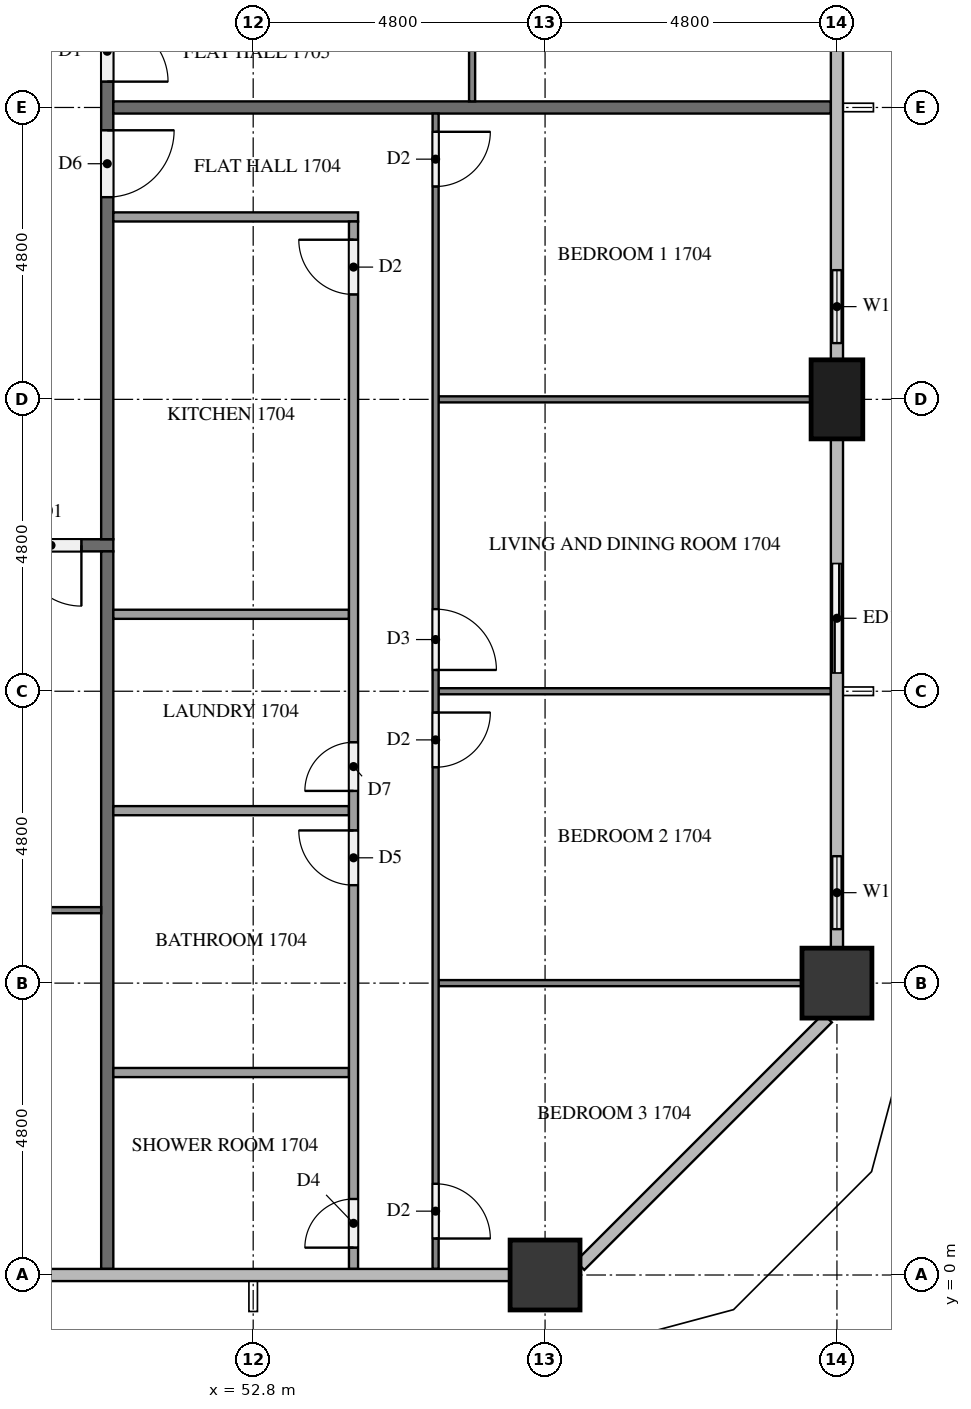
"""IFC4 building model, lengths in metres.
Left out: names, types, materials, properties, quantities, classifications, styles, units other than length and angle.
Written with IfcOpenShell. Run it as: python <this file> out.ifc"""

import sys

from ifc_helpers import new_model, si_unit, direction, frame, frame_2d, origin, origin_2d, place, context, subcontext, project, spatial, rectangle, extrude, element, fill, save


model = new_model("IFC4")
c1 = context("Model", 3, precision=1e-05, world=origin(), true_north=direction((0.0, 1.0)))
c2 = subcontext(c1, "Body", "Model", "MODEL_VIEW")
j1 = project(units=[si_unit("LENGTHUNIT", "METRE"), si_unit("PLANEANGLEUNIT", "RADIAN")], contexts=[c1])
p1 = place(None, origin())
s1 = spatial("IfcSite", under=j1, at=p1, CompositionType="ELEMENT")
p2 = place(p1, origin())
s2 = spatial("IfcBuilding", under=s1, at=p2, CompositionType="ELEMENT")
p3 = place(p2, frame((0.0, 0.0, 69.8)))
s3 = spatial("IfcBuildingStorey", under=s2, at=p3, CompositionType="ELEMENT", Elevation=69.8)
for number, where, z_axis, x_axis in (
    (1, (57.6, 0.0, 0.0), (0.0, 0.0, 1.0), (1.0, 0.0, 0.0)),
    (2, (62.4, 4.8, 0.0), (0.0, 0.0, 1.0), (1.0, 0.0, 0.0)),
):
    element("IfcColumn", number, at=place(p3, frame(where, z_axis=z_axis, x_axis=x_axis)), inside=s3, PredefinedType="COLUMN", context=c2, shape_type="SweptSolid", body=[
        extrude(rectangle(XDim=1.15, YDim=1.15, at=origin_2d()), origin(), (0.0, 0.0, 1.0), 3.2),
    ])
p4 = place(p3, frame((62.4, 14.4, 0.0), z_axis=(0.0, 0.0, 1.0), x_axis=(0.0, 1.0, 0.0)))
e3 = element("IfcColumn", 3, at=p4, inside=s3, PredefinedType="COLUMN", context=c2, shape_type="SweptSolid", body=[
    extrude(rectangle(XDim=1.3, YDim=0.85, at=origin_2d()), origin(), (0.0, 0.0, 1.0), 3.2),
])
p5 = place(p3, frame((62.4, 5.375, 0.0), z_axis=(0.0, 0.0, 1.0), x_axis=(0.0, 1.0, 0.0)))
e4 = element("IfcWall", 4, at=p5, inside=s3, PredefinedType="SOLIDWALL", context=c2, shape_type="SweptSolid", body=[
    extrude(rectangle(XDim=1.825, YDim=0.15, at=frame_2d((0.913, 0.0))), origin(), (0.0, 0.0, 1.0), 3.2),
])
p6 = place(p5, frame((0.312, 0.0, 0.9)))
e5 = element("IfcOpeningElement", 5, at=p6, cuts=e4, PredefinedType="OPENING", context=c2, shape_type="SweptSolid", body=[
    extrude(rectangle(XDim=1.2, YDim=1.4, at=frame_2d((0.6, 0.7))), frame((0.0, 0.085, 0.0), z_axis=(0.0, -1.0, 0.0), x_axis=(1.0, 0.0, 0.0)), (0.0, 0.0, 1.0), 0.17),
])
p7 = place(p3, frame((62.4, 9.6, 0.0), z_axis=(0.0, 0.0, 1.0), x_axis=(0.0, 1.0, 0.0)))
e6 = element("IfcWall", 6, at=p7, inside=s3, PredefinedType="SOLIDWALL", context=c2, shape_type="SweptSolid", body=[
    extrude(rectangle(XDim=2.4, YDim=0.15, at=frame_2d((1.2, 0.0))), origin(), (0.0, 0.0, 1.0), 3.2),
])
p8 = place(p7, frame((0.3, 0.0, 0.0)))
e7 = element("IfcOpeningElement", 7, at=p8, cuts=e6, PredefinedType="OPENING", context=c2, shape_type="SweptSolid", body=[
    extrude(rectangle(XDim=1.8, YDim=2.4, at=frame_2d((0.9, 1.2))), frame((0.0, 0.085, 0.0), z_axis=(0.0, -1.0, 0.0), x_axis=(1.0, 0.0, 0.0)), (0.0, 0.0, 1.0), 0.17),
])
p9 = place(p3, frame((62.4, 15.05, 0.0), z_axis=(0.0, 0.0, 1.0), x_axis=(0.0, 1.0, 0.0)))
e8 = element("IfcWall", 8, at=p9, inside=s3, PredefinedType="SOLIDWALL", context=c2, shape_type="SweptSolid", body=[
    extrude(rectangle(XDim=1.75, YDim=0.15, at=frame_2d((0.875, 0.0))), origin(), (0.0, 0.0, 1.0), 3.2),
])
p10 = place(p9, frame((0.275, 0.0, 0.9)))
e9 = element("IfcOpeningElement", 9, at=p10, cuts=e8, PredefinedType="OPENING", context=c2, shape_type="SweptSolid", body=[
    extrude(rectangle(XDim=1.2, YDim=1.4, at=frame_2d((0.6, 0.7))), frame((0.0, 0.085, 0.0), z_axis=(0.0, -1.0, 0.0), x_axis=(1.0, 0.0, 0.0)), (0.0, 0.0, 1.0), 0.17),
])
p11 = place(p3, frame((50.5, 12.0, 0.0), z_axis=(0.0, 0.0, 1.0), x_axis=(-1.0, 0.0, 0.0)))
e10 = element("IfcWall", 10, at=p11, inside=s3, PredefinedType="PARTITIONING", context=c2, shape_type="SweptSolid", body=[
    extrude(rectangle(XDim=38.6, YDim=0.2, at=frame_2d((19.3, 0.0))), origin(), (0.0, 0.0, 1.0), 3.2),
])
p12 = place(p11, frame((37.075, 0.0, 0.0)))
e11 = element("IfcOpeningElement", 11, at=p12, cuts=e10, PredefinedType="OPENING", context=c2, shape_type="SweptSolid", body=[
    extrude(rectangle(XDim=1.0, YDim=2.1, at=frame_2d((0.5, 1.05))), frame((0.0, 0.11, 0.0), z_axis=(0.0, -1.0, 0.0), x_axis=(1.0, 0.0, 0.0)), (0.0, 0.0, 1.0), 0.22),
])
p13 = place(p11, frame((22.675, 0.0, 0.0)))
e12 = element("IfcOpeningElement", 12, at=p13, cuts=e10, PredefinedType="OPENING", context=c2, shape_type="SweptSolid", body=[
    extrude(rectangle(XDim=1.0, YDim=2.1, at=frame_2d((0.5, 1.05))), frame((0.0, 0.11, 0.0), z_axis=(0.0, -1.0, 0.0), x_axis=(1.0, 0.0, 0.0)), (0.0, 0.0, 1.0), 0.22),
])
p14 = place(p11, frame((0.525, 0.0, 0.0)))
e13 = element("IfcOpeningElement", 13, at=p14, cuts=e10, PredefinedType="OPENING", context=c2, shape_type="SweptSolid", body=[
    extrude(rectangle(XDim=1.0, YDim=2.1, at=frame_2d((0.5, 1.05))), frame((0.0, 0.11, 0.0), z_axis=(0.0, -1.0, 0.0), x_axis=(1.0, 0.0, 0.0)), (0.0, 0.0, 1.0), 0.22),
])
p15 = place(p3, frame((50.4, 40.7, 0.0), z_axis=(0.0, 0.0, 1.0), x_axis=(0.0, -1.0, 0.0)))
e14 = element("IfcWall", 14, at=p15, inside=s3, PredefinedType="PARTITIONING", context=c2, shape_type="SweptSolid", body=[
    extrude(rectangle(XDim=28.6, YDim=0.2, at=frame_2d((14.3, 0.0))), origin(), (0.0, 0.0, 1.0), 3.2),
])
p16 = place(p15, frame((21.875, 0.0, 0.0)))
e15 = element("IfcOpeningElement", 15, at=p16, cuts=e14, PredefinedType="OPENING", context=c2, shape_type="SweptSolid", body=[
    extrude(rectangle(XDim=1.1, YDim=2.1, at=frame_2d((0.55, 1.05))), frame((0.0, 0.11, 0.0), z_axis=(0.0, -1.0, 0.0), x_axis=(1.0, 0.0, 0.0)), (0.0, 0.0, 1.0), 0.22),
])
p17 = place(p15, frame((20.075, 0.0, 0.0)))
e16 = element("IfcOpeningElement", 16, at=p17, cuts=e14, PredefinedType="OPENING", context=c2, shape_type="SweptSolid", body=[
    extrude(rectangle(XDim=1.0, YDim=2.1, at=frame_2d((0.5, 1.05))), frame((0.0, 0.11, 0.0), z_axis=(0.0, -1.0, 0.0), x_axis=(1.0, 0.0, 0.0)), (0.0, 0.0, 1.0), 0.22),
])
p18 = place(p15, frame((5.675, 0.0, 0.0)))
e17 = element("IfcOpeningElement", 17, at=p18, cuts=e14, PredefinedType="OPENING", context=c2, shape_type="SweptSolid", body=[
    extrude(rectangle(XDim=1.0, YDim=2.1, at=frame_2d((0.5, 1.05))), frame((0.0, 0.11, 0.0), z_axis=(0.0, -1.0, 0.0), x_axis=(1.0, 0.0, 0.0)), (0.0, 0.0, 1.0), 0.22),
])
p19 = place(p3, frame((50.4, 11.9, 0.0), z_axis=(0.0, 0.0, 1.0), x_axis=(0.0, -1.0, 0.0)))
e18 = element("IfcWall", 18, at=p19, inside=s3, PredefinedType="PARTITIONING", context=c2, shape_type="SweptSolid", body=[
    extrude(rectangle(XDim=11.8, YDim=0.2, at=frame_2d((5.9, 0.0))), origin(), (0.0, 0.0, 1.0), 3.2),
])
p20 = place(p3, frame((50.5, 19.2, 0.0), z_axis=(0.0, 0.0, 1.0), x_axis=(1.0, 0.0, 0.0)))
e19 = element("IfcWall", 19, at=p20, inside=s3, PredefinedType="PARTITIONING", context=c2, shape_type="SweptSolid", body=[
    extrude(rectangle(XDim=11.8, YDim=0.2, at=frame_2d((5.9, 0.0))), origin(), (0.0, 0.0, 1.0), 3.2),
])
p21 = place(p3, frame((50.3, 6.0, 0.0), z_axis=(0.0, 0.0, 1.0), x_axis=(-1.0, 0.0, 0.0)))
e20 = element("IfcWall", 20, at=p21, inside=s3, PredefinedType="PARTITIONING", context=c2, shape_type="SweptSolid", body=[
    extrude(rectangle(XDim=11.8, YDim=0.1, at=frame_2d((5.9, 0.0))), origin(), (0.0, 0.0, 1.0), 3.2),
])
p22 = place(p21, frame((5.75, 0.0, 0.0)))
e21 = element("IfcOpeningElement", 21, at=p22, cuts=e20, PredefinedType="OPENING", context=c2, shape_type="SweptSolid", body=[
    extrude(rectangle(XDim=1.0, YDim=2.1, at=frame_2d((0.5, 1.05))), frame((0.0, 0.06, 0.0), z_axis=(0.0, -1.0, 0.0), x_axis=(1.0, 0.0, 0.0)), (0.0, 0.0, 1.0), 0.12),
])
p23 = place(p21, frame((7.45, 0.0, 0.0)))
e22 = element("IfcOpeningElement", 22, at=p23, cuts=e20, PredefinedType="OPENING", context=c2, shape_type="SweptSolid", body=[
    extrude(rectangle(XDim=0.9, YDim=2.1, at=frame_2d((0.45, 1.05))), frame((0.0, 0.06, 0.0), z_axis=(0.0, -1.0, 0.0), x_axis=(1.0, 0.0, 0.0)), (0.0, 0.0, 1.0), 0.12),
])
p24 = place(p3, frame((55.85, 14.4, 0.0), z_axis=(0.0, 0.0, 1.0), x_axis=(1.0, 0.0, 0.0)))
e23 = element("IfcWall", 23, at=p24, inside=s3, PredefinedType="PARTITIONING", context=c2, shape_type="SweptSolid", body=[
    extrude(rectangle(XDim=6.125, YDim=0.1, at=frame_2d((3.062, 0.0))), origin(), (0.0, 0.0, 1.0), 3.2),
])
p25 = place(p3, frame((55.85, 9.6, 0.0), z_axis=(0.0, 0.0, 1.0), x_axis=(1.0, 0.0, 0.0)))
e24 = element("IfcWall", 24, at=p25, inside=s3, PredefinedType="PARTITIONING", context=c2, shape_type="SweptSolid", body=[
    extrude(rectangle(XDim=6.45, YDim=0.1, at=frame_2d((3.225, 0.0))), origin(), (0.0, 0.0, 1.0), 3.2),
])
p26 = place(p3, frame((55.85, 4.8, 0.0), z_axis=(0.0, 0.0, 1.0), x_axis=(1.0, 0.0, 0.0)))
e25 = element("IfcWall", 25, at=p26, inside=s3, PredefinedType="PARTITIONING", context=c2, shape_type="SweptSolid", body=[
    extrude(rectangle(XDim=5.975, YDim=0.1, at=frame_2d((2.987, 0.0))), origin(), (0.0, 0.0, 1.0), 3.2),
])
p27 = place(p3, frame((55.8, 19.1, 0.0), z_axis=(0.0, 0.0, 1.0), x_axis=(0.0, -1.0, 0.0)))
e26 = element("IfcWall", 26, at=p27, inside=s3, PredefinedType="PARTITIONING", context=c2, shape_type="SweptSolid", body=[
    extrude(rectangle(XDim=19.0, YDim=0.1, at=frame_2d((9.5, 0.0))), origin(), (0.0, 0.0, 1.0), 3.2),
])
p28 = place(p27, frame((0.3, 0.0, 0.0)))
e27 = element("IfcOpeningElement", 27, at=p28, cuts=e26, PredefinedType="OPENING", context=c2, shape_type="SweptSolid", body=[
    extrude(rectangle(XDim=0.9, YDim=2.1, at=frame_2d((0.45, 1.05))), frame((0.0, 0.06, 0.0), z_axis=(0.0, -1.0, 0.0), x_axis=(1.0, 0.0, 0.0)), (0.0, 0.0, 1.0), 0.12),
])
p29 = place(p27, frame((8.15, 0.0, 0.0)))
e28 = element("IfcOpeningElement", 28, at=p29, cuts=e26, PredefinedType="OPENING", context=c2, shape_type="SweptSolid", body=[
    extrude(rectangle(XDim=1.0, YDim=2.1, at=frame_2d((0.5, 1.05))), frame((0.0, 0.06, 0.0), z_axis=(0.0, -1.0, 0.0), x_axis=(1.0, 0.0, 0.0)), (0.0, 0.0, 1.0), 0.12),
])
p30 = place(p27, frame((9.85, 0.0, 0.0)))
e29 = element("IfcOpeningElement", 29, at=p30, cuts=e26, PredefinedType="OPENING", context=c2, shape_type="SweptSolid", body=[
    extrude(rectangle(XDim=0.9, YDim=2.1, at=frame_2d((0.45, 1.05))), frame((0.0, 0.06, 0.0), z_axis=(0.0, -1.0, 0.0), x_axis=(1.0, 0.0, 0.0)), (0.0, 0.0, 1.0), 0.12),
])
p31 = place(p27, frame((17.6, 0.0, 0.0)))
e30 = element("IfcOpeningElement", 30, at=p31, cuts=e26, PredefinedType="OPENING", context=c2, shape_type="SweptSolid", body=[
    extrude(rectangle(XDim=0.9, YDim=2.1, at=frame_2d((0.45, 1.05))), frame((0.0, 0.06, 0.0), z_axis=(0.0, -1.0, 0.0), x_axis=(1.0, 0.0, 0.0)), (0.0, 0.0, 1.0), 0.12),
])
for number, where, z_axis, x_axis in (
    (31, (50.5, 10.865, 0.0), (0.0, 0.0, 1.0), (1.0, 0.0, 0.0)),
    (32, (50.5, 7.636, 0.0), (0.0, 0.0, 1.0), (1.0, 0.0, 0.0)),
    (33, (50.5, 3.33, 0.0), (0.0, 0.0, 1.0), (1.0, 0.0, 0.0)),
):
    element("IfcWall", number, at=place(p3, frame(where, z_axis=z_axis, x_axis=x_axis)), inside=s3, PredefinedType="PARTITIONING", context=c2, shape_type="SweptSolid", body=[
        extrude(rectangle(XDim=3.875, YDim=0.15, at=frame_2d((1.938, 0.0))), origin(), (0.0, 0.0, 1.0), 3.2),
    ])
p32 = place(p3, frame((50.5, 17.4, 0.0), z_axis=(0.0, 0.0, 1.0), x_axis=(1.0, 0.0, 0.0)))
e34 = element("IfcWall", 34, at=p32, inside=s3, PredefinedType="PARTITIONING", context=c2, shape_type="SweptSolid", body=[
    extrude(rectangle(XDim=4.025, YDim=0.15, at=frame_2d((2.012, 0.0))), origin(), (0.0, 0.0, 1.0), 3.2),
])
p33 = place(p3, frame((54.45, 0.1, 0.0), z_axis=(0.0, 0.0, 1.0), x_axis=(0.0, 1.0, 0.0)))
e35 = element("IfcWall", 35, at=p33, inside=s3, PredefinedType="PARTITIONING", context=c2, shape_type="SweptSolid", body=[
    extrude(rectangle(XDim=17.225, YDim=0.15, at=frame_2d((8.612, 0.0))), origin(), (0.0, 0.0, 1.0), 3.2),
])
p34 = place(p33, frame((16.025, 0.0, 0.0)))
e36 = element("IfcOpeningElement", 36, at=p34, cuts=e35, PredefinedType="OPENING", context=c2, shape_type="SweptSolid", body=[
    extrude(rectangle(XDim=0.9, YDim=2.1, at=frame_2d((0.45, 1.05))), frame((0.0, 0.085, 0.0), z_axis=(0.0, -1.0, 0.0), x_axis=(1.0, 0.0, 0.0)), (0.0, 0.0, 1.0), 0.17),
])
p35 = place(p33, frame((7.861, 0.0, 0.0)))
e37 = element("IfcOpeningElement", 37, at=p35, cuts=e35, PredefinedType="OPENING", context=c2, shape_type="SweptSolid", body=[
    extrude(rectangle(XDim=0.8, YDim=2.1, at=frame_2d((0.4, 1.05))), frame((0.0, 0.085, 0.0), z_axis=(0.0, -1.0, 0.0), x_axis=(1.0, 0.0, 0.0)), (0.0, 0.0, 1.0), 0.17),
])
p36 = place(p33, frame((6.311, 0.0, 0.0)))
e38 = element("IfcOpeningElement", 38, at=p36, cuts=e35, PredefinedType="OPENING", context=c2, shape_type="SweptSolid", body=[
    extrude(rectangle(XDim=0.9, YDim=2.1, at=frame_2d((0.45, 1.05))), frame((0.0, 0.085, 0.0), z_axis=(0.0, -1.0, 0.0), x_axis=(1.0, 0.0, 0.0)), (0.0, 0.0, 1.0), 0.17),
])
p37 = place(p33, frame((0.35, 0.0, 0.0)))
e39 = element("IfcOpeningElement", 39, at=p37, cuts=e35, PredefinedType="OPENING", context=c2, shape_type="SweptSolid", body=[
    extrude(rectangle(XDim=0.8, YDim=2.1, at=frame_2d((0.4, 1.05))), frame((0.0, 0.085, 0.0), z_axis=(0.0, -1.0, 0.0), x_axis=(1.0, 0.0, 0.0)), (0.0, 0.0, 1.0), 0.17),
])
p38 = place(p3, frame((56.4, 33.5, 0.0), z_axis=(0.0, 0.0, 1.0), x_axis=(0.0, -1.0, 0.0)))
e40 = element("IfcWall", 40, at=p38, inside=s3, PredefinedType="PARTITIONING", context=c2, shape_type="SweptSolid", body=[
    extrude(rectangle(XDim=14.2, YDim=0.1, at=frame_2d((7.1, 0.0))), origin(), (0.0, 0.0, 1.0), 3.2),
])
p39 = place(p38, frame((9.85, 0.0, 0.0)))
e41 = element("IfcOpeningElement", 41, at=p39, cuts=e40, PredefinedType="OPENING", context=c2, shape_type="SweptSolid", body=[
    extrude(rectangle(XDim=0.9, YDim=2.1, at=frame_2d((0.45, 1.05))), frame((0.0, 0.06, 0.0), z_axis=(0.0, -1.0, 0.0), x_axis=(1.0, 0.0, 0.0)), (0.0, 0.0, 1.0), 0.12),
])
p40 = place(p38, frame((8.15, 0.0, 0.0)))
e42 = element("IfcOpeningElement", 42, at=p40, cuts=e40, PredefinedType="OPENING", context=c2, shape_type="SweptSolid", body=[
    extrude(rectangle(XDim=1.0, YDim=2.1, at=frame_2d((0.5, 1.05))), frame((0.0, 0.06, 0.0), z_axis=(0.0, -1.0, 0.0), x_axis=(1.0, 0.0, 0.0)), (0.0, 0.0, 1.0), 0.12),
])
p41 = place(p38, frame((0.3, 0.0, 0.0)))
e43 = element("IfcOpeningElement", 43, at=p41, cuts=e40, PredefinedType="OPENING", context=c2, shape_type="SweptSolid", body=[
    extrude(rectangle(XDim=0.9, YDim=2.1, at=frame_2d((0.45, 1.05))), frame((0.0, 0.06, 0.0), z_axis=(0.0, -1.0, 0.0), x_axis=(1.0, 0.0, 0.0)), (0.0, 0.0, 1.0), 0.12),
])
p42 = place(p6, origin())
e44 = element("IfcWindow", 44, at=p42, inside=s3, PartitioningType="SINGLE_PANEL", PredefinedType="WINDOW", context=c2, shape_type="SweptSolid", body=[
    extrude(rectangle(XDim=1.2, YDim=1.4, at=frame_2d((0.6, 0.7))), frame((0.0, 0.03, 0.0), z_axis=(0.0, -1.0, 0.0), x_axis=(1.0, 0.0, 0.0)), (0.0, 0.0, 1.0), 0.06),
])
fill(e5, e44)
p43 = place(p8, origin())
e45 = element("IfcDoor", 45, at=p43, inside=s3, OperationType="SLIDING_TO_LEFT", PredefinedType="DOOR", context=c2, shape_type="SweptSolid", body=[
    extrude(rectangle(XDim=1.8, YDim=2.4, at=frame_2d((0.9, 1.2))), frame((0.0, 0.025, 0.0), z_axis=(0.0, -1.0, 0.0), x_axis=(1.0, 0.0, 0.0)), (0.0, 0.0, 1.0), 0.05),
])
fill(e7, e45)
p44 = place(p10, origin())
e46 = element("IfcWindow", 46, at=p44, inside=s3, PartitioningType="SINGLE_PANEL", PredefinedType="WINDOW", context=c2, shape_type="SweptSolid", body=[
    extrude(rectangle(XDim=1.2, YDim=1.4, at=frame_2d((0.6, 0.7))), frame((0.0, 0.03, 0.0), z_axis=(0.0, -1.0, 0.0), x_axis=(1.0, 0.0, 0.0)), (0.0, 0.0, 1.0), 0.06),
])
fill(e9, e46)
p45 = place(p14, origin())
e47 = element("IfcDoor", 47, at=p45, inside=s3, OperationType="SINGLE_SWING_LEFT", PredefinedType="DOOR", context=c2, shape_type="SweptSolid", body=[
    extrude(rectangle(XDim=1.0, YDim=2.1, at=frame_2d((0.5, 1.05))), frame((0.0, 0.025, 0.0), z_axis=(0.0, -1.0, 0.0), x_axis=(1.0, 0.0, 0.0)), (0.0, 0.0, 1.0), 0.05),
])
fill(e13, e47)
p46 = place(p16, origin())
e48 = element("IfcDoor", 48, at=p46, inside=s3, OperationType="SINGLE_SWING_LEFT", PredefinedType="DOOR", context=c2, shape_type="SweptSolid", body=[
    extrude(rectangle(XDim=1.1, YDim=2.1, at=frame_2d((0.55, 1.05))), frame((0.0, 0.025, 0.0), z_axis=(0.0, -1.0, 0.0), x_axis=(1.0, 0.0, 0.0)), (0.0, 0.0, 1.0), 0.05),
])
fill(e15, e48)
p47 = place(p17, origin())
e49 = element("IfcDoor", 49, at=p47, inside=s3, OperationType="SINGLE_SWING_RIGHT", PredefinedType="DOOR", context=c2, shape_type="SweptSolid", body=[
    extrude(rectangle(XDim=1.0, YDim=2.1, at=frame_2d((0.5, 1.05))), frame((0.0, 0.025, 0.0), z_axis=(0.0, -1.0, 0.0), x_axis=(1.0, 0.0, 0.0)), (0.0, 0.0, 1.0), 0.05),
])
fill(e16, e49)
p48 = place(p28, origin())
e50 = element("IfcDoor", 50, at=p48, inside=s3, OperationType="SINGLE_SWING_LEFT", PredefinedType="DOOR", context=c2, shape_type="SweptSolid", body=[
    extrude(rectangle(XDim=0.9, YDim=2.1, at=frame_2d((0.45, 1.05))), frame((0.0, 0.025, 0.0), z_axis=(0.0, -1.0, 0.0), x_axis=(1.0, 0.0, 0.0)), (0.0, 0.0, 1.0), 0.05),
])
fill(e27, e50)
p49 = place(p29, origin())
e51 = element("IfcDoor", 51, at=p49, inside=s3, OperationType="SINGLE_SWING_RIGHT", PredefinedType="DOOR", context=c2, shape_type="SweptSolid", body=[
    extrude(rectangle(XDim=1.0, YDim=2.1, at=frame_2d((0.5, 1.05))), frame((0.0, 0.025, 0.0), z_axis=(0.0, -1.0, 0.0), x_axis=(1.0, 0.0, 0.0)), (0.0, 0.0, 1.0), 0.05),
])
fill(e28, e51)
p50 = place(p30, origin())
e52 = element("IfcDoor", 52, at=p50, inside=s3, OperationType="SINGLE_SWING_LEFT", PredefinedType="DOOR", context=c2, shape_type="SweptSolid", body=[
    extrude(rectangle(XDim=0.9, YDim=2.1, at=frame_2d((0.45, 1.05))), frame((0.0, 0.025, 0.0), z_axis=(0.0, -1.0, 0.0), x_axis=(1.0, 0.0, 0.0)), (0.0, 0.0, 1.0), 0.05),
])
fill(e29, e52)
p51 = place(p31, origin())
e53 = element("IfcDoor", 53, at=p51, inside=s3, OperationType="SINGLE_SWING_RIGHT", PredefinedType="DOOR", context=c2, shape_type="SweptSolid", body=[
    extrude(rectangle(XDim=0.9, YDim=2.1, at=frame_2d((0.45, 1.05))), frame((0.0, 0.025, 0.0), z_axis=(0.0, -1.0, 0.0), x_axis=(1.0, 0.0, 0.0)), (0.0, 0.0, 1.0), 0.05),
])
fill(e30, e53)
p52 = place(p34, origin())
e54 = element("IfcDoor", 54, at=p52, inside=s3, OperationType="SINGLE_SWING_RIGHT", PredefinedType="DOOR", context=c2, shape_type="SweptSolid", body=[
    extrude(rectangle(XDim=0.9, YDim=2.1, at=frame_2d((0.45, 1.05))), frame((0.0, 0.025, 0.0), z_axis=(0.0, -1.0, 0.0), x_axis=(1.0, 0.0, 0.0)), (0.0, 0.0, 1.0), 0.05),
])
fill(e36, e54)
p53 = place(p35, origin())
e55 = element("IfcDoor", 55, at=p53, inside=s3, OperationType="SINGLE_SWING_LEFT", PredefinedType="DOOR", context=c2, shape_type="SweptSolid", body=[
    extrude(rectangle(XDim=0.8, YDim=2.1, at=frame_2d((0.4, 1.05))), frame((0.0, 0.025, 0.0), z_axis=(0.0, -1.0, 0.0), x_axis=(1.0, 0.0, 0.0)), (0.0, 0.0, 1.0), 0.05),
])
fill(e37, e55)
p54 = place(p36, origin())
e56 = element("IfcDoor", 56, at=p54, inside=s3, OperationType="SINGLE_SWING_RIGHT", PredefinedType="DOOR", context=c2, shape_type="SweptSolid", body=[
    extrude(rectangle(XDim=0.9, YDim=2.1, at=frame_2d((0.45, 1.05))), frame((0.0, 0.025, 0.0), z_axis=(0.0, -1.0, 0.0), x_axis=(1.0, 0.0, 0.0)), (0.0, 0.0, 1.0), 0.05),
])
fill(e38, e56)
p55 = place(p37, origin())
e57 = element("IfcDoor", 57, at=p55, inside=s3, OperationType="SINGLE_SWING_LEFT", PredefinedType="DOOR", context=c2, shape_type="SweptSolid", body=[
    extrude(rectangle(XDim=0.8, YDim=2.1, at=frame_2d((0.4, 1.05))), frame((0.0, 0.025, 0.0), z_axis=(0.0, -1.0, 0.0), x_axis=(1.0, 0.0, 0.0)), (0.0, 0.0, 1.0), 0.05),
])
fill(e39, e57)
save(model, sys.argv[1])
